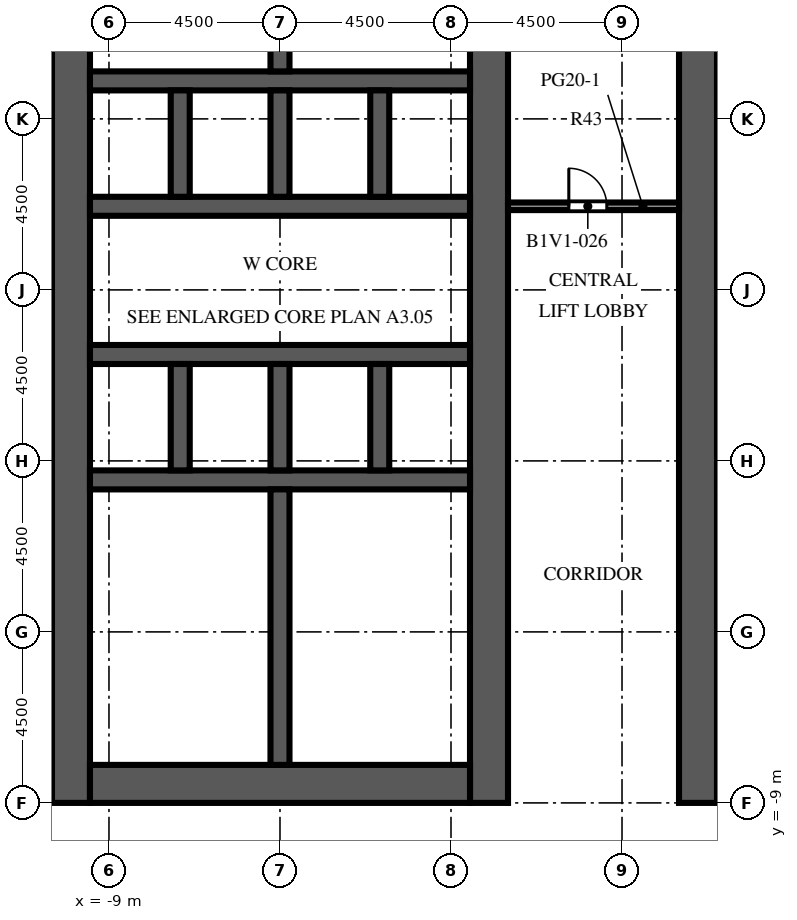
"""IFC4 building model, lengths in metres.
Left out: names, types, materials, properties, quantities, classifications, styles, units other than length and angle.
Written with IfcOpenShell. Run it as: python <this file> out.ifc"""

import sys

from ifc_helpers import new_model, si_unit, direction, frame, frame_2d, origin, place, context, subcontext, project, spatial, rectangle, extrude, element, fill, save


model = new_model("IFC4")
c1 = context("Model", 3, precision=1e-05, world=origin(), true_north=direction((0.0, 1.0)))
c2 = subcontext(c1, "Body", "Model", "MODEL_VIEW")
j1 = project(units=[si_unit("LENGTHUNIT", "METRE"), si_unit("PLANEANGLEUNIT", "RADIAN")], contexts=[c1])
p1 = place(None, origin())
s1 = spatial("IfcSite", under=j1, at=p1, CompositionType="ELEMENT")
p2 = place(p1, origin())
s2 = spatial("IfcBuilding", under=s1, at=p2, CompositionType="ELEMENT")
p3 = place(p2, frame((0.0, 0.0, 27.7)))
s3 = spatial("IfcBuildingStorey", under=s2, at=p3, CompositionType="ELEMENT", Elevation=27.7)
p4 = place(p3, frame((-10.0, -9.0, 0.0), z_axis=(0.0, 0.0, 1.0), x_axis=(0.0, 1.0, 0.0)))
e1 = element("IfcWall", 1, at=p4, inside=s3, PredefinedType="SHEAR", context=c2, shape_type="SweptSolid", body=[
    extrude(rectangle(XDim=27.5, YDim=1.0, at=frame_2d((13.75, 0.0))), origin(), (0.0, 0.0, 1.0), 4.1),
])
p5 = place(p4, frame((12.55, 0.0, 0.0)))
e2 = element("IfcOpeningElement", 2, at=p5, cuts=e1, PredefinedType="OPENING", context=c2, shape_type="SweptSolid", body=[
    extrude(rectangle(XDim=2.4, YDim=2.4, at=frame_2d((1.2, 1.2))), frame((0.0, 0.51, 0.0), z_axis=(0.0, -1.0, 0.0), x_axis=(1.0, 0.0, 0.0)), (0.0, 0.0, 1.0), 1.02),
])
p6 = place(p4, frame((6.825, 0.0, 0.0)))
e3 = element("IfcOpeningElement", 3, at=p6, cuts=e1, PredefinedType="OPENING", context=c2, shape_type="SweptSolid", body=[
    extrude(rectangle(XDim=1.2, YDim=2.1, at=frame_2d((0.6, 1.05))), frame((0.0, 0.51, 0.0), z_axis=(0.0, -1.0, 0.0), x_axis=(1.0, 0.0, 0.0)), (0.0, 0.0, 1.0), 1.02),
])
p7 = place(p4, frame((19.475, 0.0, 0.0)))
e4 = element("IfcOpeningElement", 4, at=p7, cuts=e1, PredefinedType="OPENING", context=c2, shape_type="SweptSolid", body=[
    extrude(rectangle(XDim=1.2, YDim=2.1, at=frame_2d((0.6, 1.05))), frame((0.0, 0.51, 0.0), z_axis=(0.0, -1.0, 0.0), x_axis=(1.0, 0.0, 0.0)), (0.0, 0.0, 1.0), 1.02),
])
p8 = place(p3, frame((1.0, -9.0, 0.0), z_axis=(0.0, 0.0, 1.0), x_axis=(0.0, 1.0, 0.0)))
e5 = element("IfcWall", 5, at=p8, inside=s3, PredefinedType="SHEAR", context=c2, shape_type="SweptSolid", body=[
    extrude(rectangle(XDim=27.5, YDim=1.0, at=frame_2d((13.75, 0.0))), origin(), (0.0, 0.0, 1.0), 4.1),
])
p9 = place(p8, frame((12.55, 0.0, 0.0)))
e6 = element("IfcOpeningElement", 6, at=p9, cuts=e5, PredefinedType="OPENING", context=c2, shape_type="SweptSolid", body=[
    extrude(rectangle(XDim=2.4, YDim=2.4, at=frame_2d((1.2, 1.2))), frame((0.0, 0.51, 0.0), z_axis=(0.0, -1.0, 0.0), x_axis=(1.0, 0.0, 0.0)), (0.0, 0.0, 1.0), 1.02),
])
p10 = place(p8, frame((3.955, 0.0, 0.0)))
e7 = element("IfcOpeningElement", 7, at=p10, cuts=e5, PredefinedType="OPENING", context=c2, shape_type="SweptSolid", body=[
    extrude(rectangle(XDim=0.905, YDim=2.1, at=frame_2d((0.453, 1.05))), frame((0.0, 0.51, 0.0), z_axis=(0.0, -1.0, 0.0), x_axis=(1.0, 0.0, 0.0)), (0.0, 0.0, 1.0), 1.02),
])
p11 = place(p8, frame((23.363, 0.0, 0.0)))
e8 = element("IfcOpeningElement", 8, at=p11, cuts=e5, PredefinedType="OPENING", context=c2, shape_type="SweptSolid", body=[
    extrude(rectangle(XDim=1.2, YDim=2.1, at=frame_2d((0.6, 1.05))), frame((0.0, 0.51, 0.0), z_axis=(0.0, -1.0, 0.0), x_axis=(1.0, 0.0, 0.0)), (0.0, 0.0, 1.0), 1.02),
])
p12 = place(p3, frame((-9.5, -8.5, 0.0), z_axis=(0.0, 0.0, 1.0), x_axis=(1.0, 0.0, 0.0)))
e9 = element("IfcWall", 9, at=p12, inside=s3, PredefinedType="SHEAR", context=c2, shape_type="SweptSolid", body=[
    extrude(rectangle(XDim=10.0, YDim=1.0, at=frame_2d((5.0, 0.0))), origin(), (0.0, 0.0, 1.0), 4.1),
])
p13 = place(p3, frame((-9.5, -0.5, 0.0), z_axis=(0.0, 0.0, 1.0), x_axis=(1.0, 0.0, 0.0)))
e10 = element("IfcWall", 10, at=p13, inside=s3, PredefinedType="SHEAR", context=c2, shape_type="SweptSolid", body=[
    extrude(rectangle(XDim=10.0, YDim=0.5, at=frame_2d((5.0, 0.0))), origin(), (0.0, 0.0, 1.0), 4.1),
])
p14 = place(p3, frame((-9.5, 2.8, 0.0), z_axis=(0.0, 0.0, 1.0), x_axis=(1.0, 0.0, 0.0)))
e11 = element("IfcWall", 11, at=p14, inside=s3, PredefinedType="SHEAR", context=c2, shape_type="SweptSolid", body=[
    extrude(rectangle(XDim=10.0, YDim=0.5, at=frame_2d((5.0, 0.0))), origin(), (0.0, 0.0, 1.0), 4.1),
])
p15 = place(p14, frame((0.512, 0.0, 0.0)))
e12 = element("IfcOpeningElement", 12, at=p15, cuts=e11, PredefinedType="OPENING", context=c2, shape_type="SweptSolid", body=[
    extrude(rectangle(XDim=1.1, YDim=2.1, at=frame_2d((0.55, 1.05))), frame((0.0, 0.26, 0.0), z_axis=(0.0, -1.0, 0.0), x_axis=(1.0, 0.0, 0.0)), (0.0, 0.0, 1.0), 0.52),
])
p16 = place(p14, frame((3.137, 0.0, 0.0)))
e13 = element("IfcOpeningElement", 13, at=p16, cuts=e11, PredefinedType="OPENING", context=c2, shape_type="SweptSolid", body=[
    extrude(rectangle(XDim=1.1, YDim=2.1, at=frame_2d((0.55, 1.05))), frame((0.0, 0.26, 0.0), z_axis=(0.0, -1.0, 0.0), x_axis=(1.0, 0.0, 0.0)), (0.0, 0.0, 1.0), 0.52),
])
p17 = place(p14, frame((8.387, 0.0, 0.0)))
e14 = element("IfcOpeningElement", 14, at=p17, cuts=e11, PredefinedType="OPENING", context=c2, shape_type="SweptSolid", body=[
    extrude(rectangle(XDim=1.1, YDim=2.1, at=frame_2d((0.55, 1.05))), frame((0.0, 0.26, 0.0), z_axis=(0.0, -1.0, 0.0), x_axis=(1.0, 0.0, 0.0)), (0.0, 0.0, 1.0), 0.52),
])
p18 = place(p3, frame((-9.5, 6.7, 0.0), z_axis=(0.0, 0.0, 1.0), x_axis=(1.0, 0.0, 0.0)))
e15 = element("IfcWall", 15, at=p18, inside=s3, PredefinedType="SHEAR", context=c2, shape_type="SweptSolid", body=[
    extrude(rectangle(XDim=10.0, YDim=0.5, at=frame_2d((5.0, 0.0))), origin(), (0.0, 0.0, 1.0), 4.1),
])
p19 = place(p18, frame((0.512, 0.0, 0.0)))
e16 = element("IfcOpeningElement", 16, at=p19, cuts=e15, PredefinedType="OPENING", context=c2, shape_type="SweptSolid", body=[
    extrude(rectangle(XDim=1.1, YDim=2.1, at=frame_2d((0.55, 1.05))), frame((0.0, 0.26, 0.0), z_axis=(0.0, -1.0, 0.0), x_axis=(1.0, 0.0, 0.0)), (0.0, 0.0, 1.0), 0.52),
])
p20 = place(p18, frame((3.188, 0.0, 0.0)))
e17 = element("IfcOpeningElement", 17, at=p20, cuts=e15, PredefinedType="OPENING", context=c2, shape_type="SweptSolid", body=[
    extrude(rectangle(XDim=1.0, YDim=2.1, at=frame_2d((0.5, 1.05))), frame((0.0, 0.26, 0.0), z_axis=(0.0, -1.0, 0.0), x_axis=(1.0, 0.0, 0.0)), (0.0, 0.0, 1.0), 0.52),
])
p21 = place(p18, frame((5.812, 0.0, 0.0)))
e18 = element("IfcOpeningElement", 18, at=p21, cuts=e15, PredefinedType="OPENING", context=c2, shape_type="SweptSolid", body=[
    extrude(rectangle(XDim=1.0, YDim=2.1, at=frame_2d((0.5, 1.05))), frame((0.0, 0.26, 0.0), z_axis=(0.0, -1.0, 0.0), x_axis=(1.0, 0.0, 0.0)), (0.0, 0.0, 1.0), 0.52),
])
p22 = place(p18, frame((8.438, 0.0, 0.0)))
e19 = element("IfcOpeningElement", 19, at=p22, cuts=e15, PredefinedType="OPENING", context=c2, shape_type="SweptSolid", body=[
    extrude(rectangle(XDim=1.0, YDim=2.1, at=frame_2d((0.5, 1.05))), frame((0.0, 0.26, 0.0), z_axis=(0.0, -1.0, 0.0), x_axis=(1.0, 0.0, 0.0)), (0.0, 0.0, 1.0), 0.52),
])
p23 = place(p3, frame((-9.5, 10.0, 0.0), z_axis=(0.0, 0.0, 1.0), x_axis=(1.0, 0.0, 0.0)))
e20 = element("IfcWall", 20, at=p23, inside=s3, PredefinedType="SHEAR", context=c2, shape_type="SweptSolid", body=[
    extrude(rectangle(XDim=10.0, YDim=0.5, at=frame_2d((5.0, 0.0))), origin(), (0.0, 0.0, 1.0), 4.1),
])
for number, where, z_axis, x_axis in (
    (21, (-7.125, -0.25, 0.0), (0.0, 0.0, 1.0), (0.0, 1.0, 0.0)),
    (22, (-7.125, 6.95, 0.0), (0.0, 0.0, 1.0), (0.0, 1.0, 0.0)),
    (23, (-4.5, -0.25, 0.0), (0.0, 0.0, 1.0), (0.0, 1.0, 0.0)),
    (24, (-4.5, 6.95, 0.0), (0.0, 0.0, 1.0), (0.0, 1.0, 0.0)),
    (25, (-1.875, -0.25, 0.0), (0.0, 0.0, 1.0), (0.0, 1.0, 0.0)),
    (26, (-1.875, 6.95, 0.0), (0.0, 0.0, 1.0), (0.0, 1.0, 0.0)),
):
    element("IfcWall", number, at=place(p3, frame(where, z_axis=z_axis, x_axis=x_axis)), inside=s3, PredefinedType="SHEAR", context=c2, shape_type="SweptSolid", body=[
        extrude(rectangle(XDim=2.8, YDim=0.5, at=frame_2d((1.4, 0.0))), origin(), (0.0, 0.0, 1.0), 4.1),
    ])
for number, where, z_axis, x_axis in (
    (27, (-4.5, -8.0, 0.0), (0.0, 0.0, 1.0), (0.0, 1.0, 0.0)),
    (28, (-4.5, 10.25, 0.0), (0.0, 0.0, 1.0), (0.0, 1.0, 0.0)),
):
    element("IfcWall", number, at=place(p3, frame(where, z_axis=z_axis, x_axis=x_axis)), inside=s3, PredefinedType="SHEAR", context=c2, shape_type="SweptSolid", body=[
        extrude(rectangle(XDim=7.25, YDim=0.5, at=frame_2d((3.625, 0.0))), origin(), (0.0, 0.0, 1.0), 4.1),
    ])
p24 = place(p3, frame((6.5, -9.0, 0.0), z_axis=(0.0, 0.0, 1.0), x_axis=(0.0, 1.0, 0.0)))
e29 = element("IfcWall", 29, at=p24, inside=s3, PredefinedType="SHEAR", context=c2, shape_type="SweptSolid", body=[
    extrude(rectangle(XDim=27.5, YDim=1.0, at=frame_2d((13.75, 0.0))), origin(), (0.0, 0.0, 1.0), 4.1),
])
p25 = place(p24, frame((12.55, 0.0, 0.0)))
e30 = element("IfcOpeningElement", 30, at=p25, cuts=e29, PredefinedType="OPENING", context=c2, shape_type="SweptSolid", body=[
    extrude(rectangle(XDim=2.4, YDim=2.4, at=frame_2d((1.2, 1.2))), frame((0.0, 0.51, 0.0), z_axis=(0.0, -1.0, 0.0), x_axis=(1.0, 0.0, 0.0)), (0.0, 0.0, 1.0), 1.02),
])
p26 = place(p24, frame((3.955, 0.0, 0.0)))
e31 = element("IfcOpeningElement", 31, at=p26, cuts=e29, PredefinedType="OPENING", context=c2, shape_type="SweptSolid", body=[
    extrude(rectangle(XDim=0.905, YDim=2.1, at=frame_2d((0.453, 1.05))), frame((0.0, 0.51, 0.0), z_axis=(0.0, -1.0, 0.0), x_axis=(1.0, 0.0, 0.0)), (0.0, 0.0, 1.0), 1.02),
])
p27 = place(p24, frame((23.363, 0.0, 0.0)))
e32 = element("IfcOpeningElement", 32, at=p27, cuts=e29, PredefinedType="OPENING", context=c2, shape_type="SweptSolid", body=[
    extrude(rectangle(XDim=1.2, YDim=2.1, at=frame_2d((0.6, 1.05))), frame((0.0, 0.51, 0.0), z_axis=(0.0, -1.0, 0.0), x_axis=(1.0, 0.0, 0.0)), (0.0, 0.0, 1.0), 1.02),
])
p28 = place(p3, frame((-4.25, -5.245, 0.0), z_axis=(0.0, 0.0, 1.0), x_axis=(1.0, 0.0, 0.0)))
e33 = element("IfcWall", 33, at=p28, inside=s3, PredefinedType="PARTITIONING", context=c2, shape_type="SweptSolid", body=[
    extrude(rectangle(XDim=4.75, YDim=0.1, at=frame_2d((2.375, 0.0))), origin(), (0.0, 0.0, 1.0), 3.65),
])
p29 = place(p28, frame((1.875, 0.0, 0.0)))
e34 = element("IfcOpeningElement", 34, at=p29, cuts=e33, PredefinedType="OPENING", context=c2, shape_type="SweptSolid", body=[
    extrude(rectangle(XDim=1.0, YDim=2.1, at=frame_2d((0.5, 1.05))), frame((0.0, 0.06, 0.0), z_axis=(0.0, -1.0, 0.0), x_axis=(1.0, 0.0, 0.0)), (0.0, 0.0, 1.0), 0.12),
])
p30 = place(p3, frame((-2.445, -3.94, 0.0), z_axis=(0.0, 0.0, 1.0), x_axis=(1.0, 0.0, 0.0)))
e35 = element("IfcWall", 35, at=p30, inside=s3, PredefinedType="PARTITIONING", context=c2, shape_type="SweptSolid", body=[
    extrude(rectangle(XDim=2.945, YDim=0.1, at=frame_2d((1.473, 0.0))), origin(), (0.0, 0.0, 1.0), 3.65),
])
p31 = place(p30, frame((0.972, 0.0, 0.0)))
e36 = element("IfcOpeningElement", 36, at=p31, cuts=e35, PredefinedType="OPENING", context=c2, shape_type="SweptSolid", body=[
    extrude(rectangle(XDim=1.0, YDim=2.1, at=frame_2d((0.5, 1.05))), frame((0.0, 0.06, 0.0), z_axis=(0.0, -1.0, 0.0), x_axis=(1.0, 0.0, 0.0)), (0.0, 0.0, 1.0), 0.12),
])
p32 = place(p3, frame((-4.25, -3.94, 0.0), z_axis=(0.0, 0.0, 1.0), x_axis=(1.0, 0.0, 0.0)))
e37 = element("IfcWall", 37, at=p32, inside=s3, PredefinedType="PARTITIONING", context=c2, shape_type="SweptSolid", body=[
    extrude(rectangle(XDim=1.805, YDim=0.1, at=frame_2d((0.902, 0.0))), origin(), (0.0, 0.0, 1.0), 3.65),
])
p33 = place(p32, frame((0.403, 0.0, 0.0)))
e38 = element("IfcOpeningElement", 38, at=p33, cuts=e37, PredefinedType="OPENING", context=c2, shape_type="SweptSolid", body=[
    extrude(rectangle(XDim=1.0, YDim=2.1, at=frame_2d((0.5, 1.05))), frame((0.0, 0.06, 0.0), z_axis=(0.0, -1.0, 0.0), x_axis=(1.0, 0.0, 0.0)), (0.0, 0.0, 1.0), 0.12),
])
p34 = place(p3, frame((-2.445, -3.94, 0.0), z_axis=(0.0, 0.0, 1.0), x_axis=(0.0, 1.0, 0.0)))
e39 = element("IfcWall", 39, at=p34, inside=s3, PredefinedType="PARTITIONING", context=c2, shape_type="SweptSolid", body=[
    extrude(rectangle(XDim=3.19, YDim=0.1, at=frame_2d((1.595, 0.0))), origin(), (0.0, 0.0, 1.0), 3.65),
])
p35 = place(p3, frame((1.5, 6.7, 0.0), z_axis=(0.0, 0.0, 1.0), x_axis=(1.0, 0.0, 0.0)))
e40 = element("IfcWall", 40, at=p35, inside=s3, PredefinedType="PARTITIONING", context=c2, shape_type="SweptSolid", body=[
    extrude(rectangle(XDim=4.5, YDim=0.2, at=frame_2d((2.25, 0.0))), origin(), (0.0, 0.0, 1.0), 3.65),
])
p36 = place(p35, frame((1.6, 0.0, 0.0)))
e41 = element("IfcOpeningElement", 41, at=p36, cuts=e40, PredefinedType="OPENING", context=c2, shape_type="SweptSolid", body=[
    extrude(rectangle(XDim=1.0, YDim=2.1, at=frame_2d((0.5, 1.05))), frame((0.0, 0.11, 0.0), z_axis=(0.0, -1.0, 0.0), x_axis=(1.0, 0.0, 0.0)), (0.0, 0.0, 1.0), 0.22),
])
p37 = place(p15, origin())
e42 = element("IfcDoor", 42, at=p37, inside=s3, OperationType="DOUBLE_DOOR_SLIDING", PredefinedType="DOOR", context=c2, shape_type="SweptSolid", body=[
    extrude(rectangle(XDim=1.1, YDim=2.1, at=frame_2d((0.55, 1.05))), frame((0.0, 0.025, 0.0), z_axis=(0.0, -1.0, 0.0), x_axis=(1.0, 0.0, 0.0)), (0.0, 0.0, 1.0), 0.05),
])
fill(e12, e42)
p38 = place(p16, origin())
e43 = element("IfcDoor", 43, at=p38, inside=s3, OperationType="DOUBLE_DOOR_SLIDING", PredefinedType="DOOR", context=c2, shape_type="SweptSolid", body=[
    extrude(rectangle(XDim=1.1, YDim=2.1, at=frame_2d((0.55, 1.05))), frame((0.0, 0.025, 0.0), z_axis=(0.0, -1.0, 0.0), x_axis=(1.0, 0.0, 0.0)), (0.0, 0.0, 1.0), 0.05),
])
fill(e13, e43)
p39 = place(p17, origin())
e44 = element("IfcDoor", 44, at=p39, inside=s3, OperationType="DOUBLE_DOOR_SLIDING", PredefinedType="DOOR", context=c2, shape_type="SweptSolid", body=[
    extrude(rectangle(XDim=1.1, YDim=2.1, at=frame_2d((0.55, 1.05))), frame((0.0, 0.025, 0.0), z_axis=(0.0, -1.0, 0.0), x_axis=(1.0, 0.0, 0.0)), (0.0, 0.0, 1.0), 0.05),
])
fill(e14, e44)
p40 = place(p19, origin())
e45 = element("IfcDoor", 45, at=p40, inside=s3, OperationType="DOUBLE_DOOR_SLIDING", PredefinedType="DOOR", context=c2, shape_type="SweptSolid", body=[
    extrude(rectangle(XDim=1.1, YDim=2.1, at=frame_2d((0.55, 1.05))), frame((0.0, 0.025, 0.0), z_axis=(0.0, -1.0, 0.0), x_axis=(1.0, 0.0, 0.0)), (0.0, 0.0, 1.0), 0.05),
])
fill(e16, e45)
p41 = place(p5, origin())
e46 = element("IfcDoor", 46, at=p41, inside=s3, OperationType="DOUBLE_DOOR_DOUBLE_SWING", PredefinedType="DOOR", context=c2, shape_type="SweptSolid", body=[
    extrude(rectangle(XDim=2.4, YDim=2.4, at=frame_2d((1.2, 1.2))), frame((0.0, 0.025, 0.0), z_axis=(0.0, -1.0, 0.0), x_axis=(1.0, 0.0, 0.0)), (0.0, 0.0, 1.0), 0.05),
])
fill(e2, e46)
p42 = place(p9, origin())
e47 = element("IfcDoor", 47, at=p42, inside=s3, OperationType="DOUBLE_DOOR_DOUBLE_SWING", PredefinedType="DOOR", context=c2, shape_type="SweptSolid", body=[
    extrude(rectangle(XDim=2.4, YDim=2.4, at=frame_2d((1.2, 1.2))), frame((0.0, 0.025, 0.0), z_axis=(0.0, -1.0, 0.0), x_axis=(1.0, 0.0, 0.0)), (0.0, 0.0, 1.0), 0.05),
])
fill(e6, e47)
p43 = place(p25, origin())
e48 = element("IfcDoor", 48, at=p43, inside=s3, OperationType="DOUBLE_DOOR_DOUBLE_SWING", PredefinedType="DOOR", context=c2, shape_type="SweptSolid", body=[
    extrude(rectangle(XDim=2.4, YDim=2.4, at=frame_2d((1.2, 1.2))), frame((0.0, 0.025, 0.0), z_axis=(0.0, -1.0, 0.0), x_axis=(1.0, 0.0, 0.0)), (0.0, 0.0, 1.0), 0.05),
])
fill(e30, e48)
p44 = place(p6, origin())
e49 = element("IfcDoor", 49, at=p44, inside=s3, OperationType="SINGLE_SWING_LEFT", PredefinedType="DOOR", context=c2, shape_type="SweptSolid", body=[
    extrude(rectangle(XDim=1.2, YDim=2.1, at=frame_2d((0.6, 1.05))), frame((0.0, 0.025, 0.0), z_axis=(0.0, -1.0, 0.0), x_axis=(1.0, 0.0, 0.0)), (0.0, 0.0, 1.0), 0.05),
])
fill(e3, e49)
p45 = place(p7, origin())
e50 = element("IfcDoor", 50, at=p45, inside=s3, OperationType="SINGLE_SWING_LEFT", PredefinedType="DOOR", context=c2, shape_type="SweptSolid", body=[
    extrude(rectangle(XDim=1.2, YDim=2.1, at=frame_2d((0.6, 1.05))), frame((0.0, 0.025, 0.0), z_axis=(0.0, -1.0, 0.0), x_axis=(1.0, 0.0, 0.0)), (0.0, 0.0, 1.0), 0.05),
])
fill(e4, e50)
p46 = place(p20, origin())
e51 = element("IfcDoor", 51, at=p46, inside=s3, OperationType="SINGLE_SWING_RIGHT", PredefinedType="DOOR", context=c2, shape_type="SweptSolid", body=[
    extrude(rectangle(XDim=1.0, YDim=2.1, at=frame_2d((0.5, 1.05))), frame((0.0, 0.025, 0.0), z_axis=(0.0, -1.0, 0.0), x_axis=(1.0, 0.0, 0.0)), (0.0, 0.0, 1.0), 0.05),
])
fill(e17, e51)
p47 = place(p21, origin())
e52 = element("IfcDoor", 52, at=p47, inside=s3, OperationType="SINGLE_SWING_LEFT", PredefinedType="DOOR", context=c2, shape_type="SweptSolid", body=[
    extrude(rectangle(XDim=1.0, YDim=2.1, at=frame_2d((0.5, 1.05))), frame((0.0, 0.025, 0.0), z_axis=(0.0, -1.0, 0.0), x_axis=(1.0, 0.0, 0.0)), (0.0, 0.0, 1.0), 0.05),
])
fill(e18, e52)
p48 = place(p22, origin())
e53 = element("IfcDoor", 53, at=p48, inside=s3, OperationType="SINGLE_SWING_RIGHT", PredefinedType="DOOR", context=c2, shape_type="SweptSolid", body=[
    extrude(rectangle(XDim=1.0, YDim=2.1, at=frame_2d((0.5, 1.05))), frame((0.0, 0.025, 0.0), z_axis=(0.0, -1.0, 0.0), x_axis=(1.0, 0.0, 0.0)), (0.0, 0.0, 1.0), 0.05),
])
fill(e19, e53)
p49 = place(p10, origin())
e54 = element("IfcDoor", 54, at=p49, inside=s3, OperationType="SINGLE_SWING_LEFT", PredefinedType="DOOR", context=c2, shape_type="SweptSolid", body=[
    extrude(rectangle(XDim=0.905, YDim=2.1, at=frame_2d((0.453, 1.05))), frame((0.0, 0.475, 0.0), z_axis=(0.0, -1.0, 0.0), x_axis=(1.0, 0.0, 0.0)), (0.0, 0.0, 1.0), 0.05),
])
fill(e7, e54)
p50 = place(p29, origin())
e55 = element("IfcDoor", 55, at=p50, inside=s3, OperationType="SINGLE_SWING_RIGHT", PredefinedType="DOOR", context=c2, shape_type="SweptSolid", body=[
    extrude(rectangle(XDim=1.0, YDim=2.1, at=frame_2d((0.5, 1.05))), frame((0.0, 0.025, 0.0), z_axis=(0.0, -1.0, 0.0), x_axis=(1.0, 0.0, 0.0)), (0.0, 0.0, 1.0), 0.05),
])
fill(e34, e55)
p51 = place(p31, origin())
e56 = element("IfcDoor", 56, at=p51, inside=s3, OperationType="SINGLE_SWING_LEFT", PredefinedType="DOOR", context=c2, shape_type="SweptSolid", body=[
    extrude(rectangle(XDim=1.0, YDim=2.1, at=frame_2d((0.5, 1.05))), frame((0.0, 0.025, 0.0), z_axis=(0.0, -1.0, 0.0), x_axis=(1.0, 0.0, 0.0)), (0.0, 0.0, 1.0), 0.05),
])
fill(e36, e56)
p52 = place(p33, origin())
e57 = element("IfcDoor", 57, at=p52, inside=s3, OperationType="SINGLE_SWING_RIGHT", PredefinedType="DOOR", context=c2, shape_type="SweptSolid", body=[
    extrude(rectangle(XDim=1.0, YDim=2.1, at=frame_2d((0.5, 1.05))), frame((0.0, 0.025, 0.0), z_axis=(0.0, -1.0, 0.0), x_axis=(1.0, 0.0, 0.0)), (0.0, 0.0, 1.0), 0.05),
])
fill(e38, e57)
p53 = place(p26, origin())
e58 = element("IfcDoor", 58, at=p53, inside=s3, OperationType="SINGLE_SWING_RIGHT", PredefinedType="DOOR", context=c2, shape_type="SweptSolid", body=[
    extrude(rectangle(XDim=0.905, YDim=2.1, at=frame_2d((0.453, 1.05))), frame((0.0, -0.425, 0.0), z_axis=(0.0, -1.0, 0.0), x_axis=(1.0, 0.0, 0.0)), (0.0, 0.0, 1.0), 0.05),
])
fill(e31, e58)
p54 = place(p36, origin())
e59 = element("IfcDoor", 59, at=p54, inside=s3, OperationType="SINGLE_SWING_LEFT", PredefinedType="DOOR", context=c2, shape_type="SweptSolid", body=[
    extrude(rectangle(XDim=1.0, YDim=2.1, at=frame_2d((0.5, 1.05))), frame((0.0, 0.025, 0.0), z_axis=(0.0, -1.0, 0.0), x_axis=(1.0, 0.0, 0.0)), (0.0, 0.0, 1.0), 0.05),
])
fill(e41, e59)
save(model, sys.argv[1])
